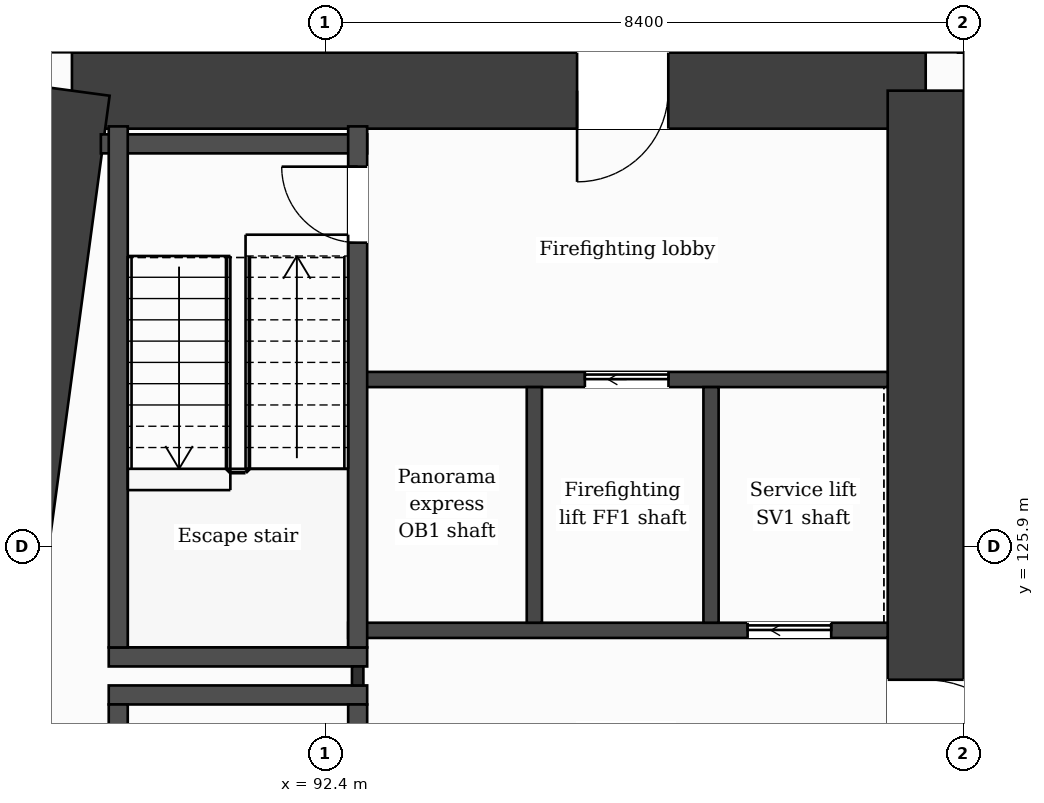
"""IFC4 building model, lengths in metres.
Left out: names, types, materials, properties, quantities, classifications, styles, units other than length and angle.
Written with IfcOpenShell. Run it as: python <this file> out.ifc"""

import sys

from ifc_helpers import new_model, si_unit, direction, frame, frame_2d, origin, place, context, subcontext, project, spatial, rectangle, extrude, element, fill, save


model = new_model("IFC4")
c1 = context("Model", 3, precision=1e-05, world=origin(), true_north=direction((0.0, 1.0)))
c2 = subcontext(c1, "Body", "Model", "MODEL_VIEW")
j1 = project(units=[si_unit("LENGTHUNIT", "METRE"), si_unit("PLANEANGLEUNIT", "RADIAN")], contexts=[c1])
p1 = place(None, origin())
s1 = spatial("IfcSite", under=j1, at=p1, CompositionType="ELEMENT")
p2 = place(p1, origin())
s2 = spatial("IfcBuilding", under=s1, at=p2, CompositionType="ELEMENT")
p3 = place(p2, frame((0.0, 0.0, 94.7)))
s3 = spatial("IfcBuildingStorey", under=s2, at=p3, CompositionType="ELEMENT", Elevation=94.7)
p4 = place(p3, frame((89.068, 131.9, 0.0), z_axis=(0.0, 0.0, 1.0), x_axis=(1.0, 0.0, 0.0)))
e1 = element("IfcWall", 1, at=p4, inside=s3, PredefinedType="SHEAR", context=c2, shape_type="SweptSolid", body=[
    extrude(rectangle(XDim=11.232, YDim=1.0, at=frame_2d((5.616, 0.0))), origin(), (0.0, 0.0, 1.0), 3.7),
])
p5 = place(p4, frame((6.646, 0.0, 0.0)))
e2 = element("IfcOpeningElement", 2, at=p5, cuts=e1, PredefinedType="OPENING", context=c2, shape_type="SweptSolid", body=[
    extrude(rectangle(XDim=1.2, YDim=2.1, at=frame_2d((0.6, 1.05))), frame((0.0, 0.51, 0.0), z_axis=(0.0, -1.0, 0.0), x_axis=(1.0, 0.0, 0.0)), (0.0, 0.0, 1.0), 1.02),
])
p6 = place(p3, frame((100.3, 131.9, 0.0), z_axis=(0.0, 0.0, 1.0), x_axis=(0.0, -1.0, 0.0)))
e3 = element("IfcWall", 3, at=p6, inside=s3, PredefinedType="SHEAR", context=c2, shape_type="SweptSolid", body=[
    extrude(rectangle(XDim=21.0, YDim=1.0, at=frame_2d((10.5, 0.0))), origin(), (0.0, 0.0, 1.0), 3.7),
])
p7 = place(p6, frame((7.75, 0.0, 0.0)))
e4 = element("IfcOpeningElement", 4, at=p7, cuts=e3, PredefinedType="OPENING", context=c2, shape_type="SweptSolid", body=[
    extrude(rectangle(XDim=1.4, YDim=2.1, at=frame_2d((0.7, 1.05))), frame((0.0, 0.51, 0.0), z_axis=(0.0, -1.0, 0.0), x_axis=(1.0, 0.0, 0.0)), (0.0, 0.0, 1.0), 1.02),
])
p8 = place(p3, frame((86.241, 110.9, 0.0), z_axis=(0.0, 0.0, 1.0), x_axis=(0.133411141623, 0.991060778808, 0.0)))
e5 = element("IfcWall", 5, at=p8, inside=s3, PredefinedType="SHEAR", context=c2, shape_type="SweptSolid", body=[
    extrude(rectangle(XDim=21.189, YDim=1.0, at=frame_2d((10.595, 0.0))), origin(), (0.0, 0.0, 1.0), 3.7),
])
p9 = place(p3, frame((91.177, 138.95, 0.0), z_axis=(0.0, 0.0, 1.0), x_axis=(-0.133426664613, -0.991058689065, 0.0)))
e6 = element("IfcWall", 6, at=p9, inside=s3, PredefinedType="SOLIDWALL", context=c2, shape_type="SweptSolid", body=[
    extrude(rectangle(XDim=6.609, YDim=0.3, at=frame_2d((3.305, 0.0))), origin(), (0.0, 0.0, 1.0), 3.38),
])
p10 = place(p9, frame((1.039, 0.0, 0.9)))
e7 = element("IfcOpeningElement", 7, at=p10, cuts=e6, PredefinedType="OPENING", context=c2, shape_type="SweptSolid", body=[
    extrude(rectangle(XDim=1.2, YDim=2.1, at=frame_2d((0.6, 1.05))), frame((0.0, 0.16, 0.0), z_axis=(0.0, -1.0, 0.0), x_axis=(1.0, 0.0, 0.0)), (0.0, 0.0, 1.0), 0.32),
])
p11 = place(p9, frame((4.294, 0.0, 0.0)))
e8 = element("IfcOpeningElement", 8, at=p11, cuts=e6, PredefinedType="OPENING", context=c2, shape_type="SweptSolid", body=[
    extrude(rectangle(XDim=1.2, YDim=2.4, at=frame_2d((0.6, 1.2))), frame((0.0, 0.16, 0.0), z_axis=(0.0, -1.0, 0.0), x_axis=(1.0, 0.0, 0.0)), (0.0, 0.0, 1.0), 0.32),
])
for number, where, z_axis, x_axis in (
    (9, (89.552, 123.95, 0.0), (0.0, 0.0, 1.0), (1.0, 0.0, 0.0)),
    (10, (89.552, 124.45, 0.0), (0.0, 0.0, 1.0), (1.0, 0.0, 0.0)),
):
    element("IfcWall", number, at=place(p3, frame(where, z_axis=z_axis, x_axis=x_axis)), inside=s3, PredefinedType="PARTITIONING", context=c2, shape_type="SweptSolid", body=[
        extrude(rectangle(XDim=3.4, YDim=0.25, at=frame_2d((1.7, 0.0))), origin(), (0.0, 0.0, 1.0), 3.38),
    ])
p12 = place(p3, frame((92.702, 124.8, 0.0), z_axis=(0.0, 0.0, 1.0), x_axis=(1.0, 0.0, 0.0)))
e11 = element("IfcWall", 11, at=p12, inside=s3, PredefinedType="PARTITIONING", context=c2, shape_type="SweptSolid", body=[
    extrude(rectangle(XDim=7.098, YDim=0.2, at=frame_2d((3.549, 0.0))), origin(), (0.0, 0.0, 1.0), 3.38),
])
p13 = place(p12, frame((5.255, 0.0, 0.0)))
e12 = element("IfcOpeningElement", 12, at=p13, cuts=e11, PredefinedType="OPENING", context=c2, shape_type="SweptSolid", body=[
    extrude(rectangle(XDim=1.1, YDim=2.1, at=frame_2d((0.55, 1.05))), frame((0.0, 0.11, 0.0), z_axis=(0.0, -1.0, 0.0), x_axis=(1.0, 0.0, 0.0)), (0.0, 0.0, 1.0), 0.22),
])
p14 = place(p3, frame((92.827, 128.1, 0.0), z_axis=(0.0, 0.0, 1.0), x_axis=(1.0, 0.0, 0.0)))
e13 = element("IfcWall", 13, at=p14, inside=s3, PredefinedType="PARTITIONING", context=c2, shape_type="SweptSolid", body=[
    extrude(rectangle(XDim=6.973, YDim=0.2, at=frame_2d((3.487, 0.0))), origin(), (0.0, 0.0, 1.0), 3.38),
])
p15 = place(p14, frame((2.989, 0.0, 0.0)))
e14 = element("IfcOpeningElement", 14, at=p15, cuts=e13, PredefinedType="OPENING", context=c2, shape_type="SweptSolid", body=[
    extrude(rectangle(XDim=1.1, YDim=2.1, at=frame_2d((0.55, 1.05))), frame((0.0, 0.11, 0.0), z_axis=(0.0, -1.0, 0.0), x_axis=(1.0, 0.0, 0.0)), (0.0, 0.0, 1.0), 0.22),
])
p16 = place(p3, frame((100.8, 130.45, 0.0), z_axis=(0.0, 0.0, 1.0), x_axis=(1.0, 0.0, 0.0)))
e15 = element("IfcWall", 15, at=p16, inside=s3, PredefinedType="PARTITIONING", context=c2, shape_type="SweptSolid", body=[
    extrude(rectangle(XDim=3.1, YDim=0.2, at=frame_2d((1.55, 0.0))), origin(), (0.0, 0.0, 1.0), 3.38),
])
p17 = place(p3, frame((89.448, 131.2, 0.0), z_axis=(0.0, 0.0, 1.0), x_axis=(1.0, 0.0, 0.0)))
e16 = element("IfcWall", 16, at=p17, inside=s3, PredefinedType="PARTITIONING", context=c2, shape_type="SweptSolid", body=[
    extrude(rectangle(XDim=3.504, YDim=0.25, at=frame_2d((1.752, 0.0))), origin(), (0.0, 0.0, 1.0), 3.38),
])
for number, where, z_axis, x_axis in (
    (17, (89.677, 116.97, 0.0), (0.0, 0.0, 1.0), (0.0, 1.0, 0.0)),
    (18, (89.677, 124.575, 0.0), (0.0, 0.0, 1.0), (0.0, 1.0, 0.0)),
):
    element("IfcWall", number, at=place(p3, frame(where, z_axis=z_axis, x_axis=x_axis)), inside=s3, PredefinedType="PARTITIONING", context=c2, shape_type="SweptSolid", body=[
        extrude(rectangle(XDim=6.855, YDim=0.25, at=frame_2d((3.427, 0.0))), origin(), (0.0, 0.0, 1.0), 3.38),
    ])
p18 = place(p3, frame((92.827, 124.075, 0.0), z_axis=(0.0, 0.0, 1.0), x_axis=(0.0, 1.0, 0.0)))
e19 = element("IfcWall", 19, at=p18, inside=s3, PredefinedType="PARTITIONING", context=c2, shape_type="SweptSolid", body=[
    extrude(rectangle(XDim=0.25, YDim=0.15, at=frame_2d((0.125, 0.0))), origin(), (0.0, 0.0, 1.0), 3.38),
])
p19 = place(p3, frame((92.827, 116.97, 0.0), z_axis=(0.0, 0.0, 1.0), x_axis=(0.0, 1.0, 0.0)))
e20 = element("IfcWall", 20, at=p19, inside=s3, PredefinedType="PARTITIONING", context=c2, shape_type="SweptSolid", body=[
    extrude(rectangle(XDim=6.855, YDim=0.25, at=frame_2d((3.427, 0.0))), origin(), (0.0, 0.0, 1.0), 3.38),
])
p20 = place(p19, frame((5.555, 0.0, 0.0)))
e21 = element("IfcOpeningElement", 21, at=p20, cuts=e20, PredefinedType="OPENING", context=c2, shape_type="SweptSolid", body=[
    extrude(rectangle(XDim=0.95, YDim=2.1, at=frame_2d((0.475, 1.05))), frame((0.0, 0.135, 0.0), z_axis=(0.0, -1.0, 0.0), x_axis=(1.0, 0.0, 0.0)), (0.0, 0.0, 1.0), 0.27),
])
p21 = place(p3, frame((92.827, 124.575, 0.0), z_axis=(0.0, 0.0, 1.0), x_axis=(0.0, 1.0, 0.0)))
e22 = element("IfcWall", 22, at=p21, inside=s3, PredefinedType="PARTITIONING", context=c2, shape_type="SweptSolid", body=[
    extrude(rectangle(XDim=6.855, YDim=0.25, at=frame_2d((3.427, 0.0))), origin(), (0.0, 0.0, 1.0), 3.38),
])
p22 = place(p21, frame((5.325, 0.0, 0.0)))
e23 = element("IfcOpeningElement", 23, at=p22, cuts=e22, PredefinedType="OPENING", context=c2, shape_type="SweptSolid", body=[
    extrude(rectangle(XDim=1.0, YDim=2.1, at=frame_2d((0.5, 1.05))), frame((0.0, 0.135, 0.0), z_axis=(0.0, -1.0, 0.0), x_axis=(1.0, 0.0, 0.0)), (0.0, 0.0, 1.0), 0.27),
])
for number, where, z_axis, x_axis in (
    (24, (95.151, 124.9, 0.0), (0.0, 0.0, 1.0), (0.0, 1.0, 0.0)),
    (25, (97.476, 124.9, 0.0), (0.0, 0.0, 1.0), (0.0, 1.0, 0.0)),
):
    element("IfcWall", number, at=place(p3, frame(where, z_axis=z_axis, x_axis=x_axis)), inside=s3, PredefinedType="PARTITIONING", context=c2, shape_type="SweptSolid", body=[
        extrude(rectangle(XDim=3.1, YDim=0.2, at=frame_2d((1.55, 0.0))), origin(), (0.0, 0.0, 1.0), 3.38),
    ])
p23 = place(p15, origin())
e26 = element("IfcDoor", 26, at=p23, inside=s3, OperationType="SLIDING_TO_LEFT", PredefinedType="DOOR", context=c2, shape_type="SweptSolid", body=[
    extrude(rectangle(XDim=1.1, YDim=2.1, at=frame_2d((0.55, 1.05))), frame((0.0, 0.025, 0.0), z_axis=(0.0, -1.0, 0.0), x_axis=(1.0, 0.0, 0.0)), (0.0, 0.0, 1.0), 0.05),
])
fill(e14, e26)
p24 = place(p13, origin())
e27 = element("IfcDoor", 27, at=p24, inside=s3, OperationType="SLIDING_TO_LEFT", PredefinedType="DOOR", context=c2, shape_type="SweptSolid", body=[
    extrude(rectangle(XDim=1.1, YDim=2.1, at=frame_2d((0.55, 1.05))), frame((0.0, 0.025, 0.0), z_axis=(0.0, -1.0, 0.0), x_axis=(1.0, 0.0, 0.0)), (0.0, 0.0, 1.0), 0.05),
])
fill(e12, e27)
p25 = place(p22, origin())
e28 = element("IfcDoor", 28, at=p25, inside=s3, OperationType="SINGLE_SWING_RIGHT", PredefinedType="DOOR", context=c2, shape_type="SweptSolid", body=[
    extrude(rectangle(XDim=1.0, YDim=2.1, at=frame_2d((0.5, 1.05))), frame((0.0, 0.025, 0.0), z_axis=(0.0, -1.0, 0.0), x_axis=(1.0, 0.0, 0.0)), (0.0, 0.0, 1.0), 0.05),
])
fill(e23, e28)
p26 = place(p5, origin())
e29 = element("IfcDoor", 29, at=p26, inside=s3, OperationType="SINGLE_SWING_LEFT", PredefinedType="DOOR", context=c2, shape_type="SweptSolid", body=[
    extrude(rectangle(XDim=1.2, YDim=2.1, at=frame_2d((0.6, 1.05))), frame((0.0, 0.025, 0.0), z_axis=(0.0, -1.0, 0.0), x_axis=(1.0, 0.0, 0.0)), (0.0, 0.0, 1.0), 0.05),
])
fill(e2, e29)
p27 = place(p7, origin())
e30 = element("IfcDoor", 30, at=p27, inside=s3, OperationType="SINGLE_SWING_RIGHT", PredefinedType="DOOR", context=c2, shape_type="SweptSolid", body=[
    extrude(rectangle(XDim=1.4, YDim=2.1, at=frame_2d((0.7, 1.05))), frame((0.0, 0.025, 0.0), z_axis=(0.0, -1.0, 0.0), x_axis=(1.0, 0.0, 0.0)), (0.0, 0.0, 1.0), 0.05),
])
fill(e4, e30)
save(model, sys.argv[1])
